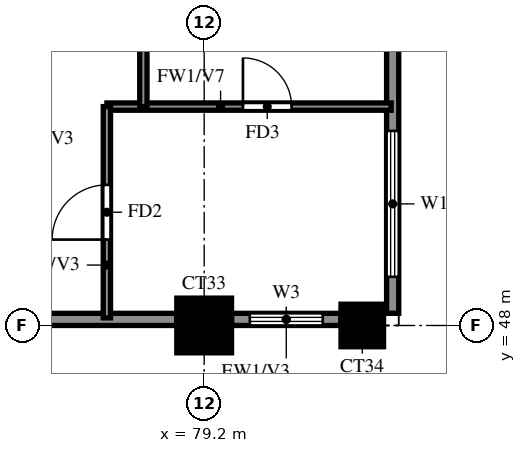
"""IFC4 building model, lengths in metres.
Left out: names, types, materials, properties, quantities, classifications, styles, units other than length and angle.
Written with IfcOpenShell. Run it as: python <this file> out.ifc"""

import sys

from ifc_helpers import new_model, si_unit, direction, frame, frame_2d, origin, origin_2d, place, context, subcontext, project, spatial, rectangle, extrude, source, transform, mapped, element, fill, save


model = new_model("IFC4")
c1 = context("Model", 3, precision=1e-05, world=origin(), true_north=direction((0.0, 1.0)))
c2 = subcontext(c1, "Body", "Model", "MODEL_VIEW")
j1 = project(units=[si_unit("LENGTHUNIT", "METRE"), si_unit("PLANEANGLEUNIT", "RADIAN")], contexts=[c1])
p1 = place(None, origin())
s1 = spatial("IfcSite", under=j1, at=p1, CompositionType="ELEMENT")
p2 = place(p1, origin())
s2 = spatial("IfcBuilding", under=s1, at=p2, CompositionType="ELEMENT")
p3 = place(p2, frame((0.0, 0.0, 222.0)))
s3 = spatial("IfcBuildingStorey", under=s2, at=p3, CompositionType="ELEMENT", Elevation=222.0)
m1 = source(origin(), c2, "Body", "SweptSolid", [
    extrude(rectangle(XDim=0.9, YDim=0.9, at=origin_2d()), origin(), (0.0, 0.0, 1.0), 3.22),
])
p4 = place(p3, frame((79.2, 48.0, 0.0), z_axis=(0.0, 0.0, 1.0), x_axis=(1.0, 0.0, 0.0)))
e1 = element("IfcColumn", 1, at=p4, inside=s3, PredefinedType="COLUMN", context=c2, shape_type="MappedRepresentation", body=[
    mapped(m1, transform((0.0, 0.0, 0.0))),
])
m2 = source(origin(), c2, "Body", "SweptSolid", [
    extrude(rectangle(XDim=0.7, YDim=0.7, at=origin_2d()), origin(), (0.0, 0.0, 1.0), 3.22),
])
p5 = place(p3, frame((81.8, 48.0, 0.0), z_axis=(0.0, 0.0, 1.0), x_axis=(1.0, 0.0, 0.0)))
e2 = element("IfcColumn", 2, at=p5, inside=s3, PredefinedType="COLUMN", context=c2, shape_type="MappedRepresentation", body=[
    mapped(m2, transform((0.0, 0.0, 0.0))),
])
p6 = place(p3, frame((81.907, 39.87, 0.0), z_axis=(0.0, 0.0, 1.0), x_axis=(-0.777936274417, 0.62834318087, 0.0)))
e3 = element("IfcWall", 3, at=p6, inside=s3, PredefinedType="SOLIDWALL", context=c2, shape_type="SweptSolid", body=[
    extrude(rectangle(XDim=13.099, YDim=0.2, at=frame_2d((6.549, 0.0))), origin(), (0.0, 0.0, 1.0), 3.22),
])
p7 = place(p6, frame((9.938, 0.0, 1.5)))
e4 = element("IfcOpeningElement", 4, at=p7, cuts=e3, PredefinedType="OPENING", context=c2, shape_type="SweptSolid", body=[
    extrude(rectangle(XDim=0.9, YDim=0.9, at=frame_2d((0.45, 0.45))), frame((0.0, 0.11, 0.0), z_axis=(0.0, -1.0, 0.0), x_axis=(1.0, 0.0, 0.0)), (0.0, 0.0, 1.0), 0.22),
])
p8 = place(p3, frame((71.987, 48.1, 0.0), z_axis=(0.0, 0.0, 1.0), x_axis=(1.0, 0.0, 0.0)))
e5 = element("IfcWall", 5, at=p8, inside=s3, PredefinedType="SOLIDWALL", context=c2, shape_type="SweptSolid", body=[
    extrude(rectangle(XDim=6.763, YDim=0.2, at=frame_2d((3.381, 0.0))), origin(), (0.0, 0.0, 1.0), 3.22),
])
p9 = place(p8, frame((1.406, 0.0, 1.5)))
e6 = element("IfcOpeningElement", 6, at=p9, cuts=e5, PredefinedType="OPENING", context=c2, shape_type="SweptSolid", body=[
    extrude(rectangle(XDim=0.9, YDim=0.9, at=frame_2d((0.45, 0.45))), frame((0.0, 0.11, 0.0), z_axis=(0.0, -1.0, 0.0), x_axis=(1.0, 0.0, 0.0)), (0.0, 0.0, 1.0), 0.22),
])
p10 = place(p3, frame((79.65, 48.1, 0.0), z_axis=(0.0, 0.0, 1.0), x_axis=(1.0, 0.0, 0.0)))
e7 = element("IfcWall", 7, at=p10, inside=s3, PredefinedType="SOLIDWALL", context=c2, shape_type="SweptSolid", body=[
    extrude(rectangle(XDim=1.8, YDim=0.2, at=frame_2d((0.9, 0.0))), origin(), (0.0, 0.0, 1.0), 3.22),
])
p11 = place(p10, frame((0.3, 0.0, 0.6)))
e8 = element("IfcOpeningElement", 8, at=p11, cuts=e7, PredefinedType="OPENING", context=c2, shape_type="SweptSolid", body=[
    extrude(rectangle(XDim=1.2, YDim=2.4, at=frame_2d((0.6, 1.2))), frame((0.0, 0.11, 0.0), z_axis=(0.0, -1.0, 0.0), x_axis=(1.0, 0.0, 0.0)), (0.0, 0.0, 1.0), 0.22),
])
p12 = place(p3, frame((82.3, 48.2, 0.0), z_axis=(0.0, 0.0, 1.0), x_axis=(0.0, 1.0, 0.0)))
e9 = element("IfcWall", 9, at=p12, inside=s3, PredefinedType="SOLIDWALL", context=c2, shape_type="SweptSolid", body=[
    extrude(rectangle(XDim=28.6, YDim=0.2, at=frame_2d((14.3, 0.0))), origin(), (0.0, 0.0, 1.0), 3.22),
])
p13 = place(p12, frame((11.5, 0.0, 0.0)))
e10 = element("IfcOpeningElement", 10, at=p13, cuts=e9, PredefinedType="OPENING", context=c2, shape_type="SweptSolid", body=[
    extrude(rectangle(XDim=1.8, YDim=2.4, at=frame_2d((0.9, 1.2))), frame((0.0, 0.11, 0.0), z_axis=(0.0, -1.0, 0.0), x_axis=(1.0, 0.0, 0.0)), (0.0, 0.0, 1.0), 0.22),
])
p14 = place(p12, frame((0.6, 0.0, 0.6)))
e11 = element("IfcOpeningElement", 11, at=p14, cuts=e9, PredefinedType="OPENING", context=c2, shape_type="SweptSolid", body=[
    extrude(rectangle(XDim=2.4, YDim=2.4, at=frame_2d((1.2, 1.2))), frame((0.0, 0.11, 0.0), z_axis=(0.0, -1.0, 0.0), x_axis=(1.0, 0.0, 0.0)), (0.0, 0.0, 1.0), 0.22),
])
p15 = place(p12, frame((4.75, 0.0, 1.5)))
e12 = element("IfcOpeningElement", 12, at=p15, cuts=e9, PredefinedType="OPENING", context=c2, shape_type="SweptSolid", body=[
    extrude(rectangle(XDim=0.9, YDim=0.9, at=frame_2d((0.45, 0.45))), frame((0.0, 0.11, 0.0), z_axis=(0.0, -1.0, 0.0), x_axis=(1.0, 0.0, 0.0)), (0.0, 0.0, 1.0), 0.22),
])
p16 = place(p12, frame((7.3, 0.0, 0.6)))
e13 = element("IfcOpeningElement", 13, at=p16, cuts=e9, PredefinedType="OPENING", context=c2, shape_type="SweptSolid", body=[
    extrude(rectangle(XDim=1.8, YDim=2.4, at=frame_2d((0.9, 1.2))), frame((0.0, 0.11, 0.0), z_axis=(0.0, -1.0, 0.0), x_axis=(1.0, 0.0, 0.0)), (0.0, 0.0, 1.0), 0.22),
])
p17 = place(p12, frame((10.15, 0.0, 0.6)))
e14 = element("IfcOpeningElement", 14, at=p17, cuts=e9, PredefinedType="OPENING", context=c2, shape_type="SweptSolid", body=[
    extrude(rectangle(XDim=0.9, YDim=2.4, at=frame_2d((0.45, 1.2))), frame((0.0, 0.11, 0.0), z_axis=(0.0, -1.0, 0.0), x_axis=(1.0, 0.0, 0.0)), (0.0, 0.0, 1.0), 0.22),
])
p18 = place(p12, frame((14.5, 0.0, 0.6)))
e15 = element("IfcOpeningElement", 15, at=p18, cuts=e9, PredefinedType="OPENING", context=c2, shape_type="SweptSolid", body=[
    extrude(rectangle(XDim=1.2, YDim=2.4, at=frame_2d((0.6, 1.2))), frame((0.0, 0.11, 0.0), z_axis=(0.0, -1.0, 0.0), x_axis=(1.0, 0.0, 0.0)), (0.0, 0.0, 1.0), 0.22),
])
p19 = place(p12, frame((16.75, 0.0, 0.6)))
e16 = element("IfcOpeningElement", 16, at=p19, cuts=e9, PredefinedType="OPENING", context=c2, shape_type="SweptSolid", body=[
    extrude(rectangle(XDim=0.9, YDim=2.4, at=frame_2d((0.45, 1.2))), frame((0.0, 0.11, 0.0), z_axis=(0.0, -1.0, 0.0), x_axis=(1.0, 0.0, 0.0)), (0.0, 0.0, 1.0), 0.22),
])
p20 = place(p12, frame((18.4, 0.0, 0.6)))
e17 = element("IfcOpeningElement", 17, at=p20, cuts=e9, PredefinedType="OPENING", context=c2, shape_type="SweptSolid", body=[
    extrude(rectangle(XDim=2.4, YDim=2.4, at=frame_2d((1.2, 1.2))), frame((0.0, 0.11, 0.0), z_axis=(0.0, -1.0, 0.0), x_axis=(1.0, 0.0, 0.0)), (0.0, 0.0, 1.0), 0.22),
])
p21 = place(p12, frame((22.0, 0.0, 0.6)))
e18 = element("IfcOpeningElement", 18, at=p21, cuts=e9, PredefinedType="OPENING", context=c2, shape_type="SweptSolid", body=[
    extrude(rectangle(XDim=2.4, YDim=2.4, at=frame_2d((1.2, 1.2))), frame((0.0, 0.11, 0.0), z_axis=(0.0, -1.0, 0.0), x_axis=(1.0, 0.0, 0.0)), (0.0, 0.0, 1.0), 0.22),
])
p22 = place(p12, frame((25.5, 0.0, 0.6)))
e19 = element("IfcOpeningElement", 19, at=p22, cuts=e9, PredefinedType="OPENING", context=c2, shape_type="SweptSolid", body=[
    extrude(rectangle(XDim=2.4, YDim=2.4, at=frame_2d((1.2, 1.2))), frame((0.0, 0.11, 0.0), z_axis=(0.0, -1.0, 0.0), x_axis=(1.0, 0.0, 0.0)), (0.0, 0.0, 1.0), 0.22),
])
p23 = place(p3, frame((77.6, 51.6, 0.0), z_axis=(0.0, 0.0, 1.0), x_axis=(1.0, 0.0, 0.0)))
e20 = element("IfcWall", 20, at=p23, inside=s3, PredefinedType="PARTITIONING", context=c2, shape_type="SweptSolid", body=[
    extrude(rectangle(XDim=4.675, YDim=0.12, at=frame_2d((2.337, 0.0))), origin(), (0.0, 0.0, 1.0), 2.32),
])
p24 = place(p23, frame((2.238, 0.0, 0.0)))
e21 = element("IfcOpeningElement", 21, at=p24, cuts=e20, PredefinedType="OPENING", context=c2, shape_type="SweptSolid", body=[
    extrude(rectangle(XDim=0.8, YDim=2.1, at=frame_2d((0.4, 1.05))), frame((0.0, 0.07, 0.0), z_axis=(0.0, -1.0, 0.0), x_axis=(1.0, 0.0, 0.0)), (0.0, 0.0, 1.0), 0.14),
])
p25 = place(p3, frame((77.6, 48.125, 0.0), z_axis=(0.0, 0.0, 1.0), x_axis=(0.0, 1.0, 0.0)))
e22 = element("IfcWall", 22, at=p25, inside=s3, PredefinedType="PARTITIONING", context=c2, shape_type="SweptSolid", body=[
    extrude(rectangle(XDim=3.475, YDim=0.12, at=frame_2d((1.738, 0.0))), origin(), (0.0, 0.0, 1.0), 3.22),
])
p26 = place(p25, frame((1.288, 0.0, 0.0)))
e23 = element("IfcOpeningElement", 23, at=p26, cuts=e22, PredefinedType="OPENING", context=c2, shape_type="SweptSolid", body=[
    extrude(rectangle(XDim=0.9, YDim=2.1, at=frame_2d((0.45, 1.05))), frame((0.0, 0.07, 0.0), z_axis=(0.0, -1.0, 0.0), x_axis=(1.0, 0.0, 0.0)), (0.0, 0.0, 1.0), 0.14),
])
p27 = place(p3, frame((78.2, 51.6, 0.0), z_axis=(0.0, 0.0, 1.0), x_axis=(0.0, 1.0, 0.0)))
e24 = element("IfcWall", 24, at=p27, inside=s3, PredefinedType="PARTITIONING", context=c2, shape_type="SweptSolid", body=[
    extrude(rectangle(XDim=3.6, YDim=0.12, at=frame_2d((1.8, 0.0))), origin(), (0.0, 0.0, 1.0), 3.22),
])
p28 = place(p11, origin())
e25 = element("IfcWindow", 25, at=p28, inside=s3, PartitioningType="SINGLE_PANEL", PredefinedType="WINDOW", context=c2, shape_type="SweptSolid", body=[
    extrude(rectangle(XDim=1.2, YDim=2.4, at=frame_2d((0.6, 1.2))), frame((0.0, 0.03, 0.0), z_axis=(0.0, -1.0, 0.0), x_axis=(1.0, 0.0, 0.0)), (0.0, 0.0, 1.0), 0.06),
])
fill(e8, e25)
p29 = place(p14, origin())
e26 = element("IfcWindow", 26, at=p29, inside=s3, PartitioningType="DOUBLE_PANEL_VERTICAL", PredefinedType="WINDOW", context=c2, shape_type="SweptSolid", body=[
    extrude(rectangle(XDim=2.4, YDim=2.4, at=frame_2d((1.2, 1.2))), frame((0.0, 0.03, 0.0), z_axis=(0.0, -1.0, 0.0), x_axis=(1.0, 0.0, 0.0)), (0.0, 0.0, 1.0), 0.06),
])
fill(e11, e26)
p30 = place(p26, origin())
e27 = element("IfcDoor", 27, at=p30, inside=s3, OperationType="SINGLE_SWING_RIGHT", PredefinedType="DOOR", context=c2, shape_type="SweptSolid", body=[
    extrude(rectangle(XDim=0.9, YDim=2.1, at=frame_2d((0.45, 1.05))), frame((0.0, 0.025, 0.0), z_axis=(0.0, -1.0, 0.0), x_axis=(1.0, 0.0, 0.0)), (0.0, 0.0, 1.0), 0.05),
])
fill(e23, e27)
p31 = place(p24, origin())
e28 = element("IfcDoor", 28, at=p31, inside=s3, OperationType="SINGLE_SWING_LEFT", PredefinedType="DOOR", context=c2, shape_type="SweptSolid", body=[
    extrude(rectangle(XDim=0.8, YDim=2.1, at=frame_2d((0.4, 1.05))), frame((0.0, 0.025, 0.0), z_axis=(0.0, -1.0, 0.0), x_axis=(1.0, 0.0, 0.0)), (0.0, 0.0, 1.0), 0.05),
])
fill(e21, e28)
save(model, sys.argv[1])
